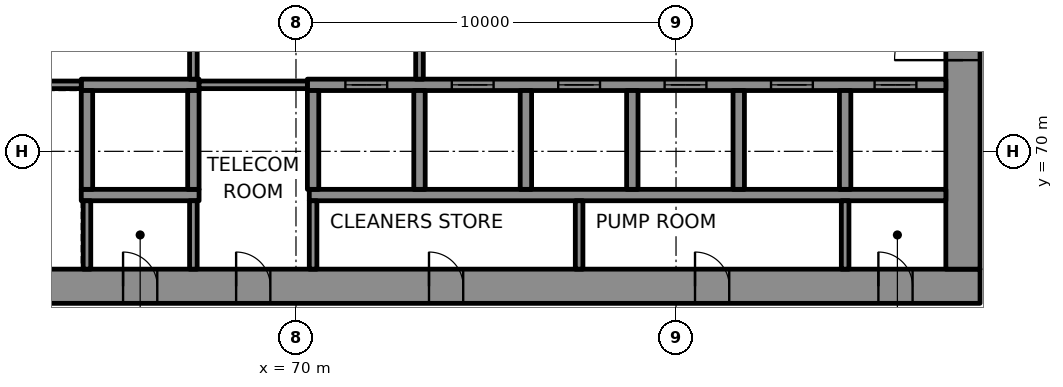
"""IFC4 building model, lengths in metres.
Left out: names, types, materials, properties, quantities, classifications, styles, units other than length and angle.
Written with IfcOpenShell. Run it as: python <this file> out.ifc"""

import sys

from ifc_helpers import new_model, si_unit, direction, frame, frame_2d, origin, place, context, subcontext, project, spatial, rectangle, extrude, element, fill, save


model = new_model("IFC4")
c1 = context("Model", 3, precision=1e-05, world=origin(), true_north=direction((0.0, 1.0)))
c2 = subcontext(c1, "Body", "Model", "MODEL_VIEW")
j1 = project(units=[si_unit("LENGTHUNIT", "METRE"), si_unit("PLANEANGLEUNIT", "RADIAN")], contexts=[c1])
p1 = place(None, origin())
s1 = spatial("IfcSite", under=j1, at=p1, CompositionType="ELEMENT")
p2 = place(p1, origin())
s2 = spatial("IfcBuilding", under=s1, at=p2, CompositionType="ELEMENT")
p3 = place(p2, frame((0.0, 0.0, 17.2)))
s3 = spatial("IfcBuildingStorey", under=s2, at=p3, CompositionType="ELEMENT", Elevation=17.2)
p4 = place(p3, frame((62.0, 66.45, 0.0), z_axis=(0.0, 0.0, 1.0), x_axis=(1.0, 0.0, 0.0)))
e1 = element("IfcWall", 1, at=p4, inside=s3, PredefinedType="SHEAR", context=c2, shape_type="SweptSolid", body=[
    extrude(rectangle(XDim=26.0, YDim=0.9, at=frame_2d((13.0, 0.0))), origin(), (0.0, 0.0, 1.0), 4.3),
])
p5 = place(p4, frame((3.45, 0.0, 0.0)))
e2 = element("IfcOpeningElement", 2, at=p5, cuts=e1, PredefinedType="OPENING", context=c2, shape_type="SweptSolid", body=[
    extrude(rectangle(XDim=0.9, YDim=2.1, at=frame_2d((0.45, 1.05))), frame((0.0, 0.46, 0.0), z_axis=(0.0, -1.0, 0.0), x_axis=(1.0, 0.0, 0.0)), (0.0, 0.0, 1.0), 0.92),
])
p6 = place(p4, frame((6.425, 0.0, 0.0)))
e3 = element("IfcOpeningElement", 3, at=p6, cuts=e1, PredefinedType="OPENING", context=c2, shape_type="SweptSolid", body=[
    extrude(rectangle(XDim=0.9, YDim=2.1, at=frame_2d((0.45, 1.05))), frame((0.0, 0.46, 0.0), z_axis=(0.0, -1.0, 0.0), x_axis=(1.0, 0.0, 0.0)), (0.0, 0.0, 1.0), 0.92),
])
p7 = place(p4, frame((11.5, 0.0, 0.0)))
e4 = element("IfcOpeningElement", 4, at=p7, cuts=e1, PredefinedType="OPENING", context=c2, shape_type="SweptSolid", body=[
    extrude(rectangle(XDim=0.9, YDim=2.1, at=frame_2d((0.45, 1.05))), frame((0.0, 0.46, 0.0), z_axis=(0.0, -1.0, 0.0), x_axis=(1.0, 0.0, 0.0)), (0.0, 0.0, 1.0), 0.92),
])
p8 = place(p4, frame((18.5, 0.0, 0.0)))
e5 = element("IfcOpeningElement", 5, at=p8, cuts=e1, PredefinedType="OPENING", context=c2, shape_type="SweptSolid", body=[
    extrude(rectangle(XDim=0.9, YDim=2.1, at=frame_2d((0.45, 1.05))), frame((0.0, 0.46, 0.0), z_axis=(0.0, -1.0, 0.0), x_axis=(1.0, 0.0, 0.0)), (0.0, 0.0, 1.0), 0.92),
])
p9 = place(p4, frame((23.325, 0.0, 0.0)))
e6 = element("IfcOpeningElement", 6, at=p9, cuts=e1, PredefinedType="OPENING", context=c2, shape_type="SweptSolid", body=[
    extrude(rectangle(XDim=0.9, YDim=2.1, at=frame_2d((0.45, 1.05))), frame((0.0, 0.46, 0.0), z_axis=(0.0, -1.0, 0.0), x_axis=(1.0, 0.0, 0.0)), (0.0, 0.0, 1.0), 0.92),
])
p10 = place(p3, frame((87.55, 66.9, 0.0), z_axis=(0.0, 0.0, 1.0), x_axis=(0.0, 1.0, 0.0)))
e7 = element("IfcWall", 7, at=p10, inside=s3, PredefinedType="SHEAR", context=c2, shape_type="SweptSolid", body=[
    extrude(rectangle(XDim=16.2, YDim=0.9, at=frame_2d((8.1, 0.0))), origin(), (0.0, 0.0, 1.0), 4.3),
])
p11 = place(p10, frame((5.5, 0.0, 0.0)))
e8 = element("IfcOpeningElement", 8, at=p11, cuts=e7, PredefinedType="OPENING", context=c2, shape_type="SweptSolid", body=[
    extrude(rectangle(XDim=1.8, YDim=2.1, at=frame_2d((0.9, 1.05))), frame((0.0, 0.46, 0.0), z_axis=(0.0, -1.0, 0.0), x_axis=(1.0, 0.0, 0.0)), (0.0, 0.0, 1.0), 0.92),
])
p12 = place(p10, frame((12.272, 0.0, 0.0)))
e9 = element("IfcOpeningElement", 9, at=p12, cuts=e7, PredefinedType="OPENING", context=c2, shape_type="SweptSolid", body=[
    extrude(rectangle(XDim=0.9, YDim=2.1, at=frame_2d((0.45, 1.05))), frame((0.0, 0.46, 0.0), z_axis=(0.0, -1.0, 0.0), x_axis=(1.0, 0.0, 0.0)), (0.0, 0.0, 1.0), 0.92),
])
p13 = place(p3, frame((64.35, 68.85, 0.0), z_axis=(0.0, 0.0, 1.0), x_axis=(1.0, 0.0, 0.0)))
e10 = element("IfcWall", 10, at=p13, inside=s3, PredefinedType="SHEAR", context=c2, shape_type="SweptSolid", body=[
    extrude(rectangle(XDim=3.1, YDim=0.3, at=frame_2d((1.55, 0.0))), origin(), (0.0, 0.0, 1.0), 4.3),
])
p14 = place(p3, frame((70.35, 68.85, 0.0), z_axis=(0.0, 0.0, 1.0), x_axis=(1.0, 0.0, 0.0)))
e11 = element("IfcWall", 11, at=p14, inside=s3, PredefinedType="SHEAR", context=c2, shape_type="SweptSolid", body=[
    extrude(rectangle(XDim=16.75, YDim=0.3, at=frame_2d((8.375, 0.0))), origin(), (0.0, 0.0, 1.0), 4.3),
])
p15 = place(p3, frame((64.35, 71.75, 0.0), z_axis=(0.0, 0.0, 1.0), x_axis=(1.0, 0.0, 0.0)))
e12 = element("IfcWall", 12, at=p15, inside=s3, PredefinedType="SHEAR", context=c2, shape_type="SweptSolid", body=[
    extrude(rectangle(XDim=3.1, YDim=0.3, at=frame_2d((1.55, 0.0))), origin(), (0.0, 0.0, 1.0), 4.3),
])
p16 = place(p3, frame((70.3, 71.75, 0.0), z_axis=(0.0, 0.0, 1.0), x_axis=(1.0, 0.0, 0.0)))
e13 = element("IfcWall", 13, at=p16, inside=s3, PredefinedType="SHEAR", context=c2, shape_type="SweptSolid", body=[
    extrude(rectangle(XDim=16.8, YDim=0.3, at=frame_2d((8.4, 0.0))), origin(), (0.0, 0.0, 1.0), 4.3),
])
p17 = place(p16, frame((1.0, 0.0, 0.0)))
e14 = element("IfcOpeningElement", 14, at=p17, cuts=e13, PredefinedType="OPENING", context=c2, shape_type="SweptSolid", body=[
    extrude(rectangle(XDim=1.1, YDim=2.1, at=frame_2d((0.55, 1.05))), frame((0.0, 0.16, 0.0), z_axis=(0.0, -1.0, 0.0), x_axis=(1.0, 0.0, 0.0)), (0.0, 0.0, 1.0), 0.32),
])
p18 = place(p16, frame((3.8, 0.0, 0.0)))
e15 = element("IfcOpeningElement", 15, at=p18, cuts=e13, PredefinedType="OPENING", context=c2, shape_type="SweptSolid", body=[
    extrude(rectangle(XDim=1.1, YDim=2.1, at=frame_2d((0.55, 1.05))), frame((0.0, 0.16, 0.0), z_axis=(0.0, -1.0, 0.0), x_axis=(1.0, 0.0, 0.0)), (0.0, 0.0, 1.0), 0.32),
])
p19 = place(p16, frame((6.6, 0.0, 0.0)))
e16 = element("IfcOpeningElement", 16, at=p19, cuts=e13, PredefinedType="OPENING", context=c2, shape_type="SweptSolid", body=[
    extrude(rectangle(XDim=1.1, YDim=2.1, at=frame_2d((0.55, 1.05))), frame((0.0, 0.16, 0.0), z_axis=(0.0, -1.0, 0.0), x_axis=(1.0, 0.0, 0.0)), (0.0, 0.0, 1.0), 0.32),
])
p20 = place(p16, frame((9.4, 0.0, 0.0)))
e17 = element("IfcOpeningElement", 17, at=p20, cuts=e13, PredefinedType="OPENING", context=c2, shape_type="SweptSolid", body=[
    extrude(rectangle(XDim=1.1, YDim=2.1, at=frame_2d((0.55, 1.05))), frame((0.0, 0.16, 0.0), z_axis=(0.0, -1.0, 0.0), x_axis=(1.0, 0.0, 0.0)), (0.0, 0.0, 1.0), 0.32),
])
p21 = place(p16, frame((12.2, 0.0, 0.0)))
e18 = element("IfcOpeningElement", 18, at=p21, cuts=e13, PredefinedType="OPENING", context=c2, shape_type="SweptSolid", body=[
    extrude(rectangle(XDim=1.1, YDim=2.1, at=frame_2d((0.55, 1.05))), frame((0.0, 0.16, 0.0), z_axis=(0.0, -1.0, 0.0), x_axis=(1.0, 0.0, 0.0)), (0.0, 0.0, 1.0), 0.32),
])
p22 = place(p16, frame((14.925, 0.0, 0.0)))
e19 = element("IfcOpeningElement", 19, at=p22, cuts=e13, PredefinedType="OPENING", context=c2, shape_type="SweptSolid", body=[
    extrude(rectangle(XDim=1.1, YDim=2.1, at=frame_2d((0.55, 1.05))), frame((0.0, 0.16, 0.0), z_axis=(0.0, -1.0, 0.0), x_axis=(1.0, 0.0, 0.0)), (0.0, 0.0, 1.0), 0.32),
])
for number, where, z_axis, x_axis in (
    (20, (64.5, 69.0, 0.0), (0.0, 0.0, 1.0), (0.0, 1.0, 0.0)),
    (21, (67.3, 69.0, 0.0), (0.0, 0.0, 1.0), (0.0, 1.0, 0.0)),
    (22, (70.45, 69.0, 0.0), (0.0, 0.0, 1.0), (0.0, 1.0, 0.0)),
    (23, (73.25, 69.0, 0.0), (0.0, 0.0, 1.0), (0.0, 1.0, 0.0)),
    (24, (76.05, 69.0, 0.0), (0.0, 0.0, 1.0), (0.0, 1.0, 0.0)),
    (25, (78.85, 69.0, 0.0), (0.0, 0.0, 1.0), (0.0, 1.0, 0.0)),
    (26, (81.65, 69.0, 0.0), (0.0, 0.0, 1.0), (0.0, 1.0, 0.0)),
    (27, (84.45, 69.0, 0.0), (0.0, 0.0, 1.0), (0.0, 1.0, 0.0)),
):
    element("IfcWall", number, at=place(p3, frame(where, z_axis=z_axis, x_axis=x_axis)), inside=s3, PredefinedType="SHEAR", context=c2, shape_type="SweptSolid", body=[
        extrude(rectangle(XDim=2.6, YDim=0.3, at=frame_2d((1.3, 0.0))), origin(), (0.0, 0.0, 1.0), 4.3),
    ])
p23 = place(p3, frame((62.9, 71.75, 0.0), z_axis=(0.0, 0.0, 1.0), x_axis=(1.0, 0.0, 0.0)))
e28 = element("IfcWall", 28, at=p23, inside=s3, PredefinedType="PARTITIONING", context=c2, shape_type="SweptSolid", body=[
    extrude(rectangle(XDim=1.45, YDim=0.2, at=frame_2d((0.725, 0.0))), origin(), (0.0, 0.0, 1.0), 4.3),
])
p24 = place(p3, frame((67.45, 71.75, 0.0), z_axis=(0.0, 0.0, 1.0), x_axis=(1.0, 0.0, 0.0)))
e29 = element("IfcWall", 29, at=p24, inside=s3, PredefinedType="PARTITIONING", context=c2, shape_type="SweptSolid", body=[
    extrude(rectangle(XDim=2.85, YDim=0.2, at=frame_2d((1.425, 0.0))), origin(), (0.0, 0.0, 1.0), 4.3),
])
for number, where, z_axis, x_axis in (
    (30, (64.5, 66.9, 0.0), (0.0, 0.0, 1.0), (0.0, 1.0, 0.0)),
    (31, (67.3, 66.9, 0.0), (0.0, 0.0, 1.0), (0.0, 1.0, 0.0)),
):
    element("IfcWall", number, at=place(p3, frame(where, z_axis=z_axis, x_axis=x_axis)), inside=s3, PredefinedType="PARTITIONING", context=c2, shape_type="SweptSolid", body=[
        extrude(rectangle(XDim=1.8, YDim=0.2, at=frame_2d((0.9, 0.0))), origin(), (0.0, 0.0, 1.0), 4.3),
    ])
p25 = place(p3, frame((67.3, 71.9, 0.0), z_axis=(0.0, 0.0, 1.0), x_axis=(0.0, 1.0, 0.0)))
e32 = element("IfcWall", 32, at=p25, inside=s3, PredefinedType="PARTITIONING", context=c2, shape_type="SweptSolid", body=[
    extrude(rectangle(XDim=2.8, YDim=0.2, at=frame_2d((1.4, 0.0))), origin(), (0.0, 0.0, 1.0), 4.3),
])
p26 = place(p25, frame((0.8, 0.0, 0.0)))
e33 = element("IfcOpeningElement", 33, at=p26, cuts=e32, PredefinedType="OPENING", context=c2, shape_type="SweptSolid", body=[
    extrude(rectangle(XDim=1.2, YDim=2.1, at=frame_2d((0.6, 1.05))), frame((0.0, 0.11, 0.0), z_axis=(0.0, -1.0, 0.0), x_axis=(1.0, 0.0, 0.0)), (0.0, 0.0, 1.0), 0.22),
])
p27 = place(p3, frame((70.45, 66.9, 0.0), z_axis=(0.0, 0.0, 1.0), x_axis=(0.0, 1.0, 0.0)))
e34 = element("IfcWall", 34, at=p27, inside=s3, PredefinedType="PARTITIONING", context=c2, shape_type="SweptSolid", body=[
    extrude(rectangle(XDim=1.8, YDim=0.2, at=frame_2d((0.9, 0.0))), origin(), (0.0, 0.0, 1.0), 4.3),
])
p28 = place(p3, frame((73.25, 71.9, 0.0), z_axis=(0.0, 0.0, 1.0), x_axis=(0.0, 1.0, 0.0)))
e35 = element("IfcWall", 35, at=p28, inside=s3, PredefinedType="PARTITIONING", context=c2, shape_type="SweptSolid", body=[
    extrude(rectangle(XDim=2.8, YDim=0.2, at=frame_2d((1.4, 0.0))), origin(), (0.0, 0.0, 1.0), 4.3),
])
p29 = place(p28, frame((0.8, 0.0, 0.0)))
e36 = element("IfcOpeningElement", 36, at=p29, cuts=e35, PredefinedType="OPENING", context=c2, shape_type="SweptSolid", body=[
    extrude(rectangle(XDim=1.2, YDim=2.1, at=frame_2d((0.6, 1.05))), frame((0.0, 0.11, 0.0), z_axis=(0.0, -1.0, 0.0), x_axis=(1.0, 0.0, 0.0)), (0.0, 0.0, 1.0), 0.22),
])
for number, where, z_axis, x_axis in (
    (37, (77.45, 66.9, 0.0), (0.0, 0.0, 1.0), (0.0, 1.0, 0.0)),
    (38, (84.45, 66.9, 0.0), (0.0, 0.0, 1.0), (0.0, 1.0, 0.0)),
):
    element("IfcWall", number, at=place(p3, frame(where, z_axis=z_axis, x_axis=x_axis)), inside=s3, PredefinedType="PARTITIONING", context=c2, shape_type="SweptSolid", body=[
        extrude(rectangle(XDim=1.8, YDim=0.2, at=frame_2d((0.9, 0.0))), origin(), (0.0, 0.0, 1.0), 4.3),
    ])
p30 = place(p3, frame((107.106, 62.36, 0.0), z_axis=(0.0, 0.0, 1.0), x_axis=(-0.49999992739, 0.866025445706, 0.0)))
e39 = element("IfcWall", 39, at=p30, inside=s3, PredefinedType="SOLIDWALL", context=c2, shape_type="SweptSolid", body=[
    extrude(rectangle(XDim=54.0, YDim=0.4, at=frame_2d((27.0, 0.0))), origin(), (0.0, 0.0, 1.0), 4.24),
])
p31 = place(p3, frame((112.496, 65.725, 0.0), z_axis=(0.0, 0.0, 1.0), x_axis=(-0.499998673217, 0.866026169802, 0.0)))
e40 = element("IfcWall", 40, at=p31, inside=s3, PredefinedType="PARTITIONING", context=c2, shape_type="SweptSolid", body=[
    extrude(rectangle(XDim=53.48, YDim=0.2, at=frame_2d((26.74, 0.0))), origin(), (0.0, 0.0, 1.0), 4.24),
])
p32 = place(p31, frame((13.08, 0.0, 0.0)))
e41 = element("IfcOpeningElement", 41, at=p32, cuts=e40, PredefinedType="OPENING", context=c2, shape_type="SweptSolid", body=[
    extrude(rectangle(XDim=1.0, YDim=2.1, at=frame_2d((0.5, 1.05))), frame((0.0, 0.11, 0.0), z_axis=(0.0, -1.0, 0.0), x_axis=(1.0, 0.0, 0.0)), (0.0, 0.0, 1.0), 0.22),
])
p33 = place(p31, frame((26.28, 0.0, 0.0)))
e42 = element("IfcOpeningElement", 42, at=p33, cuts=e40, PredefinedType="OPENING", context=c2, shape_type="SweptSolid", body=[
    extrude(rectangle(XDim=1.0, YDim=2.1, at=frame_2d((0.5, 1.05))), frame((0.0, 0.11, 0.0), z_axis=(0.0, -1.0, 0.0), x_axis=(1.0, 0.0, 0.0)), (0.0, 0.0, 1.0), 0.22),
])
p34 = place(p31, frame((43.88, 0.0, 0.0)))
e43 = element("IfcOpeningElement", 43, at=p34, cuts=e40, PredefinedType="OPENING", context=c2, shape_type="SweptSolid", body=[
    extrude(rectangle(XDim=1.0, YDim=2.1, at=frame_2d((0.5, 1.05))), frame((0.0, 0.11, 0.0), z_axis=(0.0, -1.0, 0.0), x_axis=(1.0, 0.0, 0.0)), (0.0, 0.0, 1.0), 0.22),
])
p35 = place(p31, frame((50.58, 0.0, 0.0)))
e44 = element("IfcOpeningElement", 44, at=p35, cuts=e40, PredefinedType="OPENING", context=c2, shape_type="SweptSolid", body=[
    extrude(rectangle(XDim=1.0, YDim=2.1, at=frame_2d((0.5, 1.05))), frame((0.0, 0.11, 0.0), z_axis=(0.0, -1.0, 0.0), x_axis=(1.0, 0.0, 0.0)), (0.0, 0.0, 1.0), 0.22),
])
p36 = place(p17, origin())
e45 = element("IfcDoor", 45, at=p36, inside=s3, OperationType="DOUBLE_DOOR_SLIDING", PredefinedType="DOOR", context=c2, shape_type="SweptSolid", body=[
    extrude(rectangle(XDim=1.1, YDim=2.1, at=frame_2d((0.55, 1.05))), frame((0.0, 0.025, 0.0), z_axis=(0.0, -1.0, 0.0), x_axis=(1.0, 0.0, 0.0)), (0.0, 0.0, 1.0), 0.05),
])
fill(e14, e45)
p37 = place(p18, origin())
e46 = element("IfcDoor", 46, at=p37, inside=s3, OperationType="DOUBLE_DOOR_SLIDING", PredefinedType="DOOR", context=c2, shape_type="SweptSolid", body=[
    extrude(rectangle(XDim=1.1, YDim=2.1, at=frame_2d((0.55, 1.05))), frame((0.0, 0.025, 0.0), z_axis=(0.0, -1.0, 0.0), x_axis=(1.0, 0.0, 0.0)), (0.0, 0.0, 1.0), 0.05),
])
fill(e15, e46)
p38 = place(p19, origin())
e47 = element("IfcDoor", 47, at=p38, inside=s3, OperationType="DOUBLE_DOOR_SLIDING", PredefinedType="DOOR", context=c2, shape_type="SweptSolid", body=[
    extrude(rectangle(XDim=1.1, YDim=2.1, at=frame_2d((0.55, 1.05))), frame((0.0, 0.025, 0.0), z_axis=(0.0, -1.0, 0.0), x_axis=(1.0, 0.0, 0.0)), (0.0, 0.0, 1.0), 0.05),
])
fill(e16, e47)
p39 = place(p20, origin())
e48 = element("IfcDoor", 48, at=p39, inside=s3, OperationType="DOUBLE_DOOR_SLIDING", PredefinedType="DOOR", context=c2, shape_type="SweptSolid", body=[
    extrude(rectangle(XDim=1.1, YDim=2.1, at=frame_2d((0.55, 1.05))), frame((0.0, 0.025, 0.0), z_axis=(0.0, -1.0, 0.0), x_axis=(1.0, 0.0, 0.0)), (0.0, 0.0, 1.0), 0.05),
])
fill(e17, e48)
p40 = place(p21, origin())
e49 = element("IfcDoor", 49, at=p40, inside=s3, OperationType="DOUBLE_DOOR_SLIDING", PredefinedType="DOOR", context=c2, shape_type="SweptSolid", body=[
    extrude(rectangle(XDim=1.1, YDim=2.1, at=frame_2d((0.55, 1.05))), frame((0.0, 0.025, 0.0), z_axis=(0.0, -1.0, 0.0), x_axis=(1.0, 0.0, 0.0)), (0.0, 0.0, 1.0), 0.05),
])
fill(e18, e49)
p41 = place(p22, origin())
e50 = element("IfcDoor", 50, at=p41, inside=s3, OperationType="DOUBLE_DOOR_SLIDING", PredefinedType="DOOR", context=c2, shape_type="SweptSolid", body=[
    extrude(rectangle(XDim=1.1, YDim=2.1, at=frame_2d((0.55, 1.05))), frame((0.0, 0.025, 0.0), z_axis=(0.0, -1.0, 0.0), x_axis=(1.0, 0.0, 0.0)), (0.0, 0.0, 1.0), 0.05),
])
fill(e19, e50)
p42 = place(p11, origin())
e51 = element("IfcDoor", 51, at=p42, inside=s3, OperationType="SINGLE_SWING_RIGHT", PredefinedType="DOOR", context=c2, shape_type="SweptSolid", body=[
    extrude(rectangle(XDim=1.8, YDim=2.1, at=frame_2d((0.9, 1.05))), frame((0.0, 0.17, 0.0), z_axis=(0.0, -1.0, 0.0), x_axis=(1.0, 0.0, 0.0)), (0.0, 0.0, 1.0), 0.34),
])
fill(e8, e51)
p43 = place(p5, origin())
e52 = element("IfcDoor", 52, at=p43, inside=s3, OperationType="SINGLE_SWING_LEFT", PredefinedType="DOOR", context=c2, shape_type="SweptSolid", body=[
    extrude(rectangle(XDim=0.9, YDim=2.1, at=frame_2d((0.45, 1.05))), frame((0.0, 0.17, 0.0), z_axis=(0.0, -1.0, 0.0), x_axis=(1.0, 0.0, 0.0)), (0.0, 0.0, 1.0), 0.34),
])
fill(e2, e52)
p44 = place(p6, origin())
e53 = element("IfcDoor", 53, at=p44, inside=s3, OperationType="SINGLE_SWING_RIGHT", PredefinedType="DOOR", context=c2, shape_type="SweptSolid", body=[
    extrude(rectangle(XDim=0.9, YDim=2.1, at=frame_2d((0.45, 1.05))), frame((0.0, 0.17, 0.0), z_axis=(0.0, -1.0, 0.0), x_axis=(1.0, 0.0, 0.0)), (0.0, 0.0, 1.0), 0.34),
])
fill(e3, e53)
p45 = place(p7, origin())
e54 = element("IfcDoor", 54, at=p45, inside=s3, OperationType="SINGLE_SWING_LEFT", PredefinedType="DOOR", context=c2, shape_type="SweptSolid", body=[
    extrude(rectangle(XDim=0.9, YDim=2.1, at=frame_2d((0.45, 1.05))), frame((0.0, 0.17, 0.0), z_axis=(0.0, -1.0, 0.0), x_axis=(1.0, 0.0, 0.0)), (0.0, 0.0, 1.0), 0.34),
])
fill(e4, e54)
p46 = place(p8, origin())
e55 = element("IfcDoor", 55, at=p46, inside=s3, OperationType="SINGLE_SWING_RIGHT", PredefinedType="DOOR", context=c2, shape_type="SweptSolid", body=[
    extrude(rectangle(XDim=0.9, YDim=2.1, at=frame_2d((0.45, 1.05))), frame((0.0, 0.17, 0.0), z_axis=(0.0, -1.0, 0.0), x_axis=(1.0, 0.0, 0.0)), (0.0, 0.0, 1.0), 0.34),
])
fill(e5, e55)
p47 = place(p9, origin())
e56 = element("IfcDoor", 56, at=p47, inside=s3, OperationType="SINGLE_SWING_LEFT", PredefinedType="DOOR", context=c2, shape_type="SweptSolid", body=[
    extrude(rectangle(XDim=0.9, YDim=2.1, at=frame_2d((0.45, 1.05))), frame((0.0, 0.17, 0.0), z_axis=(0.0, -1.0, 0.0), x_axis=(1.0, 0.0, 0.0)), (0.0, 0.0, 1.0), 0.34),
])
fill(e6, e56)
save(model, sys.argv[1])
